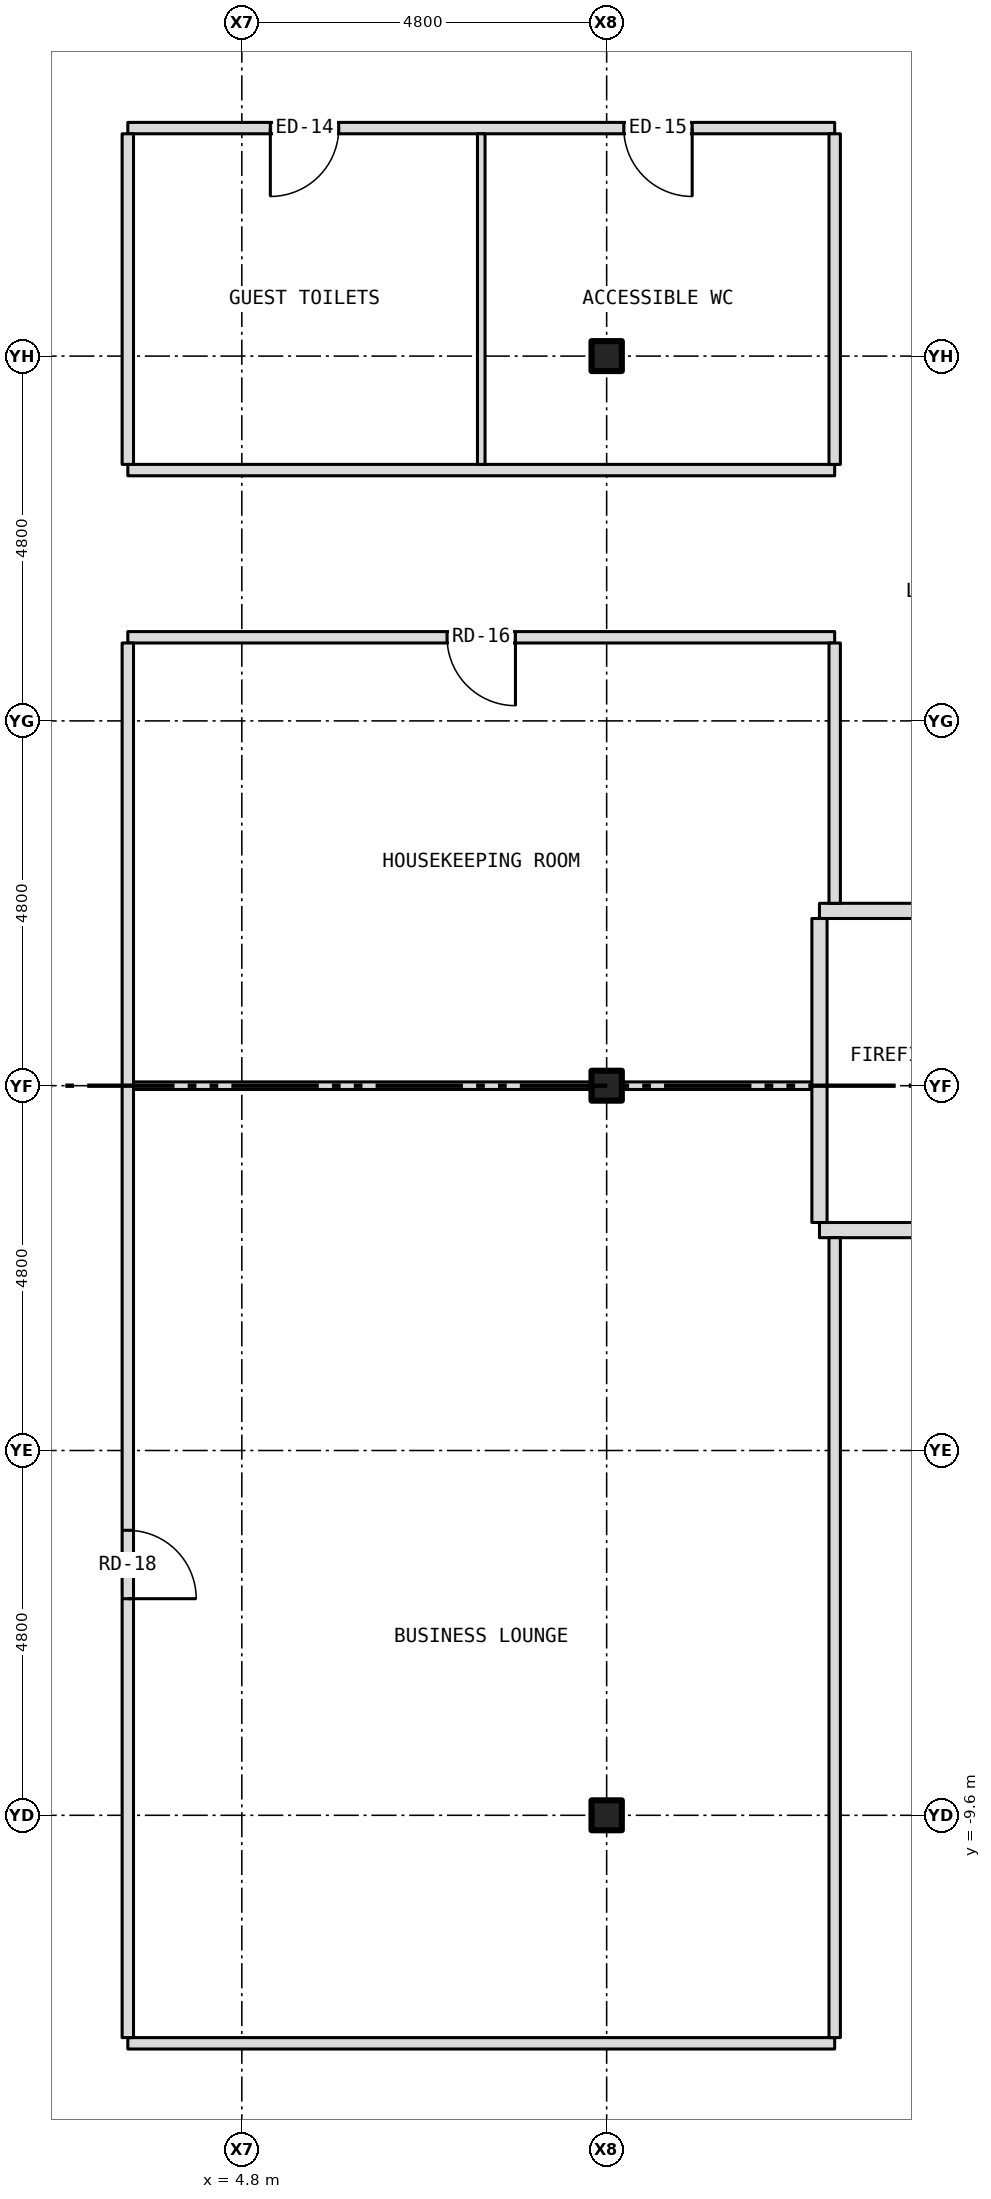
"""IFC4 building model, lengths in metres.
Left out: names, types, materials, properties, quantities, classifications, styles, units other than length and angle.
Written with IfcOpenShell. Run it as: python <this file> out.ifc"""

import sys

from ifc_helpers import new_model, si_unit, direction, frame, frame_2d, origin, origin_2d, place, context, subcontext, project, spatial, rectangle, i_section, extrude, element, fill, save


model = new_model("IFC4")
c1 = context("Model", 3, precision=1e-05, world=origin(), true_north=direction((0.0, 1.0)))
c2 = subcontext(c1, "Body", "Model", "MODEL_VIEW")
j1 = project(units=[si_unit("LENGTHUNIT", "METRE"), si_unit("PLANEANGLEUNIT", "RADIAN")], contexts=[c1])
p1 = place(None, origin())
s1 = spatial("IfcSite", under=j1, at=p1, CompositionType="ELEMENT")
p2 = place(p1, origin())
s2 = spatial("IfcBuilding", under=s1, at=p2, CompositionType="ELEMENT")
p3 = place(p2, frame((0.0, 0.0, 96.0)))
s3 = spatial("IfcBuildingStorey", under=s2, at=p3, CompositionType="ELEMENT", Elevation=96.0)
for number, where, z_axis, x_axis in (
    (1, (9.6, -9.6, -0.15), (0.0, 0.0, 1.0), (1.0, 0.0, 0.0)),
    (2, (9.6, 0.0, -0.15), (0.0, 0.0, 1.0), (1.0, 0.0, 0.0)),
    (3, (9.6, 9.6, -0.15), (0.0, 0.0, 1.0), (1.0, 0.0, 0.0)),
):
    element("IfcColumn", number, at=place(p3, frame(where, z_axis=z_axis, x_axis=x_axis)), inside=s3, PredefinedType="COLUMN", context=c2, shape_type="SweptSolid", body=[
        extrude(i_section(OverallWidth=0.399, OverallDepth=0.394, WebThickness=0.023, FlangeThickness=0.037, at=origin_2d()), origin(), (0.0, 0.0, 1.0), 3.5),
    ])
p4 = place(p3, frame((3.3, -12.6, 0.0), z_axis=(0.0, 0.0, 1.0), x_axis=(1.0, 0.0, 0.0)))
e4 = element("IfcWall", 4, at=p4, inside=s3, PredefinedType="PARTITIONING", context=c2, shape_type="SweptSolid", body=[
    extrude(rectangle(XDim=9.3, YDim=0.15, at=frame_2d((4.65, 0.0))), origin(), (0.0, 0.0, 1.0), 3.35),
])
p5 = place(p3, frame((12.4, -1.9, 0.0), z_axis=(0.0, 0.0, 1.0), x_axis=(1.0, 0.0, 0.0)))
e5 = element("IfcWall", 5, at=p5, inside=s3, PredefinedType="PARTITIONING", context=c2, shape_type="SweptSolid", body=[
    extrude(rectangle(XDim=3.28, YDim=0.2, at=frame_2d((1.64, 0.0))), origin(), (0.0, 0.0, 1.0), 3.35),
])
p6 = place(p5, frame((1.24, 0.0, 0.0)))
e6 = element("IfcOpeningElement", 6, at=p6, cuts=e5, PredefinedType="OPENING", context=c2, shape_type="SweptSolid", body=[
    extrude(rectangle(XDim=1.1, YDim=2.1, at=frame_2d((0.55, 1.05))), frame((0.0, 0.112, 0.0), z_axis=(0.0, -1.0, 0.0), x_axis=(1.0, 0.0, 0.0)), (0.0, 0.0, 1.0), 0.224),
])
p7 = place(p3, frame((3.3, 0.0, 0.0), z_axis=(0.0, 0.0, 1.0), x_axis=(1.0, 0.0, 0.0)))
e7 = element("IfcWall", 7, at=p7, inside=s3, PredefinedType="PARTITIONING", context=c2, shape_type="SweptSolid", body=[
    extrude(rectangle(XDim=6.101, YDim=0.1, at=frame_2d((3.05, 0.0))), origin(), (0.0, 0.0, 1.0), 2.728),
])
p8 = place(p3, frame((9.401, 0.0, 0.0), z_axis=(0.0, 0.0, 1.0), x_axis=(1.0, 0.0, 0.0)))
e8 = element("IfcWall", 8, at=p8, inside=s3, PredefinedType="PARTITIONING", context=c2, shape_type="SweptSolid", body=[
    extrude(rectangle(XDim=0.398, YDim=0.1, at=frame_2d((0.199, 0.0))), origin(), (0.0, 0.0, 1.0), 3.35),
])
p9 = place(p3, frame((9.799, 0.0, 0.0), z_axis=(0.0, 0.0, 1.0), x_axis=(1.0, 0.0, 0.0)))
e9 = element("IfcWall", 9, at=p9, inside=s3, PredefinedType="PARTITIONING", context=c2, shape_type="SweptSolid", body=[
    extrude(rectangle(XDim=2.601, YDim=0.1, at=frame_2d((1.3, 0.0))), origin(), (0.0, 0.0, 1.0), 2.728),
])
p10 = place(p3, frame((12.4, 2.3, 0.0), z_axis=(0.0, 0.0, 1.0), x_axis=(1.0, 0.0, 0.0)))
e10 = element("IfcWall", 10, at=p10, inside=s3, PredefinedType="PARTITIONING", context=c2, shape_type="SweptSolid", body=[
    extrude(rectangle(XDim=3.28, YDim=0.2, at=frame_2d((1.64, 0.0))), origin(), (0.0, 0.0, 1.0), 3.35),
])
p11 = place(p10, frame((1.34, 0.0, 0.0)))
e11 = element("IfcOpeningElement", 11, at=p11, cuts=e10, PredefinedType="OPENING", context=c2, shape_type="SweptSolid", body=[
    extrude(rectangle(XDim=1.1, YDim=2.1, at=frame_2d((0.55, 1.05))), frame((0.0, 0.112, 0.0), z_axis=(0.0, -1.0, 0.0), x_axis=(1.0, 0.0, 0.0)), (0.0, 0.0, 1.0), 0.224),
])
p12 = place(p3, frame((3.3, 5.9, 0.0), z_axis=(0.0, 0.0, 1.0), x_axis=(1.0, 0.0, 0.0)))
e12 = element("IfcWall", 12, at=p12, inside=s3, PredefinedType="PARTITIONING", context=c2, shape_type="SweptSolid", body=[
    extrude(rectangle(XDim=9.3, YDim=0.15, at=frame_2d((4.65, 0.0))), origin(), (0.0, 0.0, 1.0), 3.35),
])
p13 = place(p12, frame((4.2, 0.0, 0.0)))
e13 = element("IfcOpeningElement", 13, at=p13, cuts=e12, PredefinedType="OPENING", context=c2, shape_type="SweptSolid", body=[
    extrude(rectangle(XDim=0.9, YDim=2.1, at=frame_2d((0.45, 1.05))), frame((0.0, 0.087, 0.0), z_axis=(0.0, -1.0, 0.0), x_axis=(1.0, 0.0, 0.0)), (0.0, 0.0, 1.0), 0.174),
])
p14 = place(p3, frame((3.3, 8.1, 0.0), z_axis=(0.0, 0.0, 1.0), x_axis=(1.0, 0.0, 0.0)))
e14 = element("IfcWall", 14, at=p14, inside=s3, PredefinedType="PARTITIONING", context=c2, shape_type="SweptSolid", body=[
    extrude(rectangle(XDim=9.3, YDim=0.15, at=frame_2d((4.65, 0.0))), origin(), (0.0, 0.0, 1.0), 3.35),
])
p15 = place(p3, frame((3.3, 12.6, 0.0), z_axis=(0.0, 0.0, 1.0), x_axis=(1.0, 0.0, 0.0)))
e15 = element("IfcWall", 15, at=p15, inside=s3, PredefinedType="PARTITIONING", context=c2, shape_type="SweptSolid", body=[
    extrude(rectangle(XDim=9.3, YDim=0.15, at=frame_2d((4.65, 0.0))), origin(), (0.0, 0.0, 1.0), 3.35),
])
p16 = place(p15, frame((1.875, 0.0, 0.0)))
e16 = element("IfcOpeningElement", 16, at=p16, cuts=e15, PredefinedType="OPENING", context=c2, shape_type="SweptSolid", body=[
    extrude(rectangle(XDim=0.9, YDim=2.1, at=frame_2d((0.45, 1.05))), frame((0.0, 0.087, 0.0), z_axis=(0.0, -1.0, 0.0), x_axis=(1.0, 0.0, 0.0)), (0.0, 0.0, 1.0), 0.174),
])
p17 = place(p15, frame((6.525, 0.0, 0.0)))
e17 = element("IfcOpeningElement", 17, at=p17, cuts=e15, PredefinedType="OPENING", context=c2, shape_type="SweptSolid", body=[
    extrude(rectangle(XDim=0.9, YDim=2.1, at=frame_2d((0.45, 1.05))), frame((0.0, 0.087, 0.0), z_axis=(0.0, -1.0, 0.0), x_axis=(1.0, 0.0, 0.0)), (0.0, 0.0, 1.0), 0.174),
])
p18 = place(p3, frame((3.3, -12.525, 0.0), z_axis=(0.0, 0.0, 1.0), x_axis=(0.0, 1.0, 0.0)))
e18 = element("IfcWall", 18, at=p18, inside=s3, PredefinedType="PARTITIONING", context=c2, shape_type="SweptSolid", body=[
    extrude(rectangle(XDim=18.35, YDim=0.15, at=frame_2d((9.175, 0.0))), origin(), (0.0, 0.0, 1.0), 3.35),
])
p19 = place(p18, frame((5.775, 0.0, 0.0)))
e19 = element("IfcOpeningElement", 19, at=p19, cuts=e18, PredefinedType="OPENING", context=c2, shape_type="SweptSolid", body=[
    extrude(rectangle(XDim=0.9, YDim=2.1, at=frame_2d((0.45, 1.05))), frame((0.0, 0.087, 0.0), z_axis=(0.0, -1.0, 0.0), x_axis=(1.0, 0.0, 0.0)), (0.0, 0.0, 1.0), 0.174),
])
p20 = place(p3, frame((3.3, 8.175, 0.0), z_axis=(0.0, 0.0, 1.0), x_axis=(0.0, 1.0, 0.0)))
e20 = element("IfcWall", 20, at=p20, inside=s3, PredefinedType="PARTITIONING", context=c2, shape_type="SweptSolid", body=[
    extrude(rectangle(XDim=4.35, YDim=0.15, at=frame_2d((2.175, 0.0))), origin(), (0.0, 0.0, 1.0), 3.35),
])
p21 = place(p3, frame((7.95, 8.175, 0.0), z_axis=(0.0, 0.0, 1.0), x_axis=(0.0, 1.0, 0.0)))
e21 = element("IfcWall", 21, at=p21, inside=s3, PredefinedType="PARTITIONING", context=c2, shape_type="SweptSolid", body=[
    extrude(rectangle(XDim=4.35, YDim=0.1, at=frame_2d((2.175, 0.0))), origin(), (0.0, 0.0, 1.0), 3.35),
])
p22 = place(p3, frame((12.4, -1.8, 0.0), z_axis=(0.0, 0.0, 1.0), x_axis=(0.0, 1.0, 0.0)))
e22 = element("IfcWall", 22, at=p22, inside=s3, PredefinedType="PARTITIONING", context=c2, shape_type="SweptSolid", body=[
    extrude(rectangle(XDim=4.0, YDim=0.2, at=frame_2d((2.0, 0.0))), origin(), (0.0, 0.0, 1.0), 3.35),
])
p23 = place(p3, frame((12.6, -12.525, 0.0), z_axis=(0.0, 0.0, 1.0), x_axis=(0.0, 1.0, 0.0)))
e23 = element("IfcWall", 23, at=p23, inside=s3, PredefinedType="PARTITIONING", context=c2, shape_type="SweptSolid", body=[
    extrude(rectangle(XDim=10.525, YDim=0.15, at=frame_2d((5.262, 0.0))), origin(), (0.0, 0.0, 1.0), 3.35),
])
p24 = place(p3, frame((12.6, 2.4, 0.0), z_axis=(0.0, 0.0, 1.0), x_axis=(0.0, 1.0, 0.0)))
e24 = element("IfcWall", 24, at=p24, inside=s3, PredefinedType="PARTITIONING", context=c2, shape_type="SweptSolid", body=[
    extrude(rectangle(XDim=3.425, YDim=0.15, at=frame_2d((1.712, 0.0))), origin(), (0.0, 0.0, 1.0), 3.35),
])
p25 = place(p3, frame((12.6, 8.175, 0.0), z_axis=(0.0, 0.0, 1.0), x_axis=(0.0, 1.0, 0.0)))
e25 = element("IfcWall", 25, at=p25, inside=s3, PredefinedType="PARTITIONING", context=c2, shape_type="SweptSolid", body=[
    extrude(rectangle(XDim=4.35, YDim=0.15, at=frame_2d((2.175, 0.0))), origin(), (0.0, 0.0, 1.0), 3.35),
])
p26 = place(p16, origin())
e26 = element("IfcDoor", 26, at=p26, inside=s3, OperationType="SINGLE_SWING_LEFT", PredefinedType="DOOR", context=c2, shape_type="SweptSolid", body=[
    extrude(rectangle(XDim=0.9, YDim=2.1, at=frame_2d((0.45, 1.05))), frame((0.0, 0.025, 0.0), z_axis=(0.0, -1.0, 0.0), x_axis=(1.0, 0.0, 0.0)), (0.0, 0.0, 1.0), 0.05),
])
fill(e16, e26)
p27 = place(p17, origin())
e27 = element("IfcDoor", 27, at=p27, inside=s3, OperationType="SINGLE_SWING_RIGHT", PredefinedType="DOOR", context=c2, shape_type="SweptSolid", body=[
    extrude(rectangle(XDim=0.9, YDim=2.1, at=frame_2d((0.45, 1.05))), frame((0.0, 0.025, 0.0), z_axis=(0.0, -1.0, 0.0), x_axis=(1.0, 0.0, 0.0)), (0.0, 0.0, 1.0), 0.05),
])
fill(e17, e27)
p28 = place(p13, origin())
e28 = element("IfcDoor", 28, at=p28, inside=s3, OperationType="SINGLE_SWING_RIGHT", PredefinedType="DOOR", context=c2, shape_type="SweptSolid", body=[
    extrude(rectangle(XDim=0.9, YDim=2.1, at=frame_2d((0.45, 1.05))), frame((0.0, 0.025, 0.0), z_axis=(0.0, -1.0, 0.0), x_axis=(1.0, 0.0, 0.0)), (0.0, 0.0, 1.0), 0.05),
])
fill(e13, e28)
p29 = place(p19, origin())
e29 = element("IfcDoor", 29, at=p29, inside=s3, OperationType="SINGLE_SWING_LEFT", PredefinedType="DOOR", context=c2, shape_type="SweptSolid", body=[
    extrude(rectangle(XDim=0.9, YDim=2.1, at=frame_2d((0.45, 1.05))), frame((0.0, 0.025, 0.0), z_axis=(0.0, -1.0, 0.0), x_axis=(1.0, 0.0, 0.0)), (0.0, 0.0, 1.0), 0.05),
])
fill(e19, e29)
save(model, sys.argv[1])
